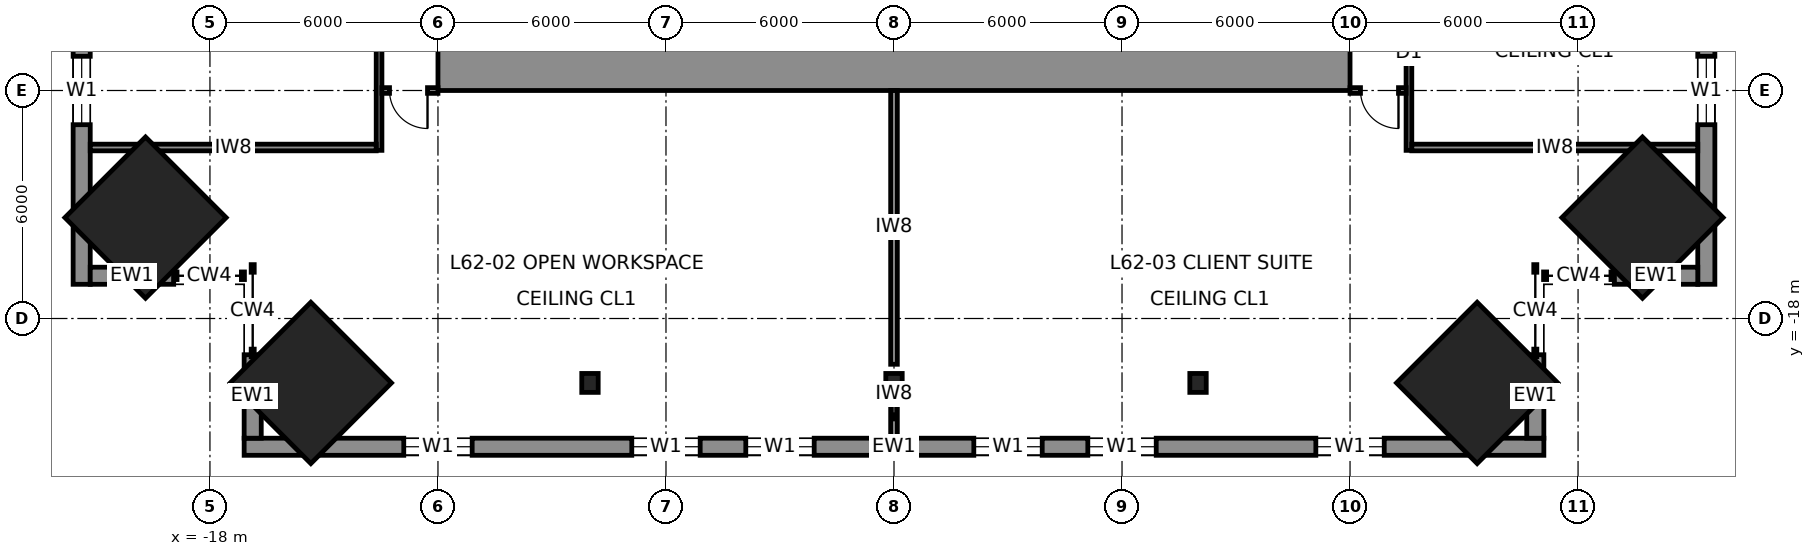
"""IFC4 building model, lengths in metres.
Left out: names, types, materials, properties, quantities, classifications, styles, units other than length and angle.
Written with IfcOpenShell. Run it as: python <this file> out.ifc"""

import sys

from ifc_helpers import new_model, si_unit, direction, frame, frame_2d, origin, origin_2d, place, context, subcontext, project, spatial, rectangle, i_section, extrude, element, fill, save


model = new_model("IFC4")
c1 = context("Model", 3, precision=1e-05, world=origin(), true_north=direction((0.0, 1.0)))
c2 = subcontext(c1, "Body", "Model", "MODEL_VIEW")
j1 = project(units=[si_unit("LENGTHUNIT", "METRE"), si_unit("PLANEANGLEUNIT", "RADIAN")], contexts=[c1])
p1 = place(None, origin())
s1 = spatial("IfcSite", under=j1, at=p1, CompositionType="ELEMENT")
p2 = place(p1, origin())
s2 = spatial("IfcBuilding", under=s1, at=p2, CompositionType="ELEMENT")
p3 = place(p2, frame((0.0, 0.0, 277.8)))
s3 = spatial("IfcBuildingStorey", under=s2, at=p3, CompositionType="ELEMENT", Elevation=277.8)
for number, where, z_axis, x_axis in (
    (1, (19.695, -15.345, 0.0), (-0.04, 0.04, 0.998), (-0.708, -0.707, 0.0)),
    (2, (15.345, -19.695, 0.0), (-0.04, 0.04, 0.998), (-0.707, -0.708, 0.0)),
    (3, (-15.345, -19.695, 0.0), (0.04, 0.04, 0.998), (-0.707, 0.708, 0.0)),
    (4, (-19.695, -15.345, 0.0), (0.04, 0.04, 0.998), (-0.708, 0.707, 0.0)),
):
    element("IfcColumn", number, at=place(p3, frame(where, z_axis=z_axis, x_axis=x_axis)), inside=s3, PredefinedType="COLUMN", context=c2, shape_type="SweptSolid", body=[
        extrude(rectangle(XDim=3.0, YDim=3.0, at=origin_2d()), origin(), (0.0, 0.0, 1.0), 4.007),
    ])
for number, where, z_axis, x_axis in (
    (5, (0.0, -19.695, 0.0), (0.0, 0.04, 0.999), (-1.0, 0.0, 0.0)),
    (6, (-8.0, -19.695, 0.0), (0.0, 0.04, 0.999), (-1.0, 0.0, 0.0)),
    (7, (8.0, -19.695, 0.0), (0.0, 0.04, 0.999), (-1.0, 0.0, 0.0)),
):
    element("IfcColumn", number, at=place(p3, frame(where, z_axis=z_axis, x_axis=x_axis)), inside=s3, PredefinedType="COLUMN", context=c2, shape_type="SweptSolid", body=[
        extrude(i_section(OverallWidth=0.432, OverallDepth=0.498, WebThickness=0.056, FlangeThickness=0.089, at=origin_2d()), origin(), (0.0, 0.0, 1.0), 4.003),
    ])
p4 = place(p3, frame((12.0, -11.25, 0.0), z_axis=(0.0, 0.0, 1.0), x_axis=(-1.0, 0.0, 0.0)))
e8 = element("IfcWall", 8, at=p4, inside=s3, PredefinedType="SHEAR", context=c2, shape_type="SweptSolid", body=[
    extrude(rectangle(XDim=24.0, YDim=1.5, at=frame_2d((12.0, 0.0))), origin(), (0.0, 0.0, 1.0), 4.0),
])
p5 = place(p3, frame((21.375, -17.1, 0.0), z_axis=(0.0, 0.0, 1.0), x_axis=(0.0, 1.0, 0.0)))
e9 = element("IfcWall", 9, at=p5, inside=s3, PredefinedType="SOLIDWALL", context=c2, shape_type="SweptSolid", body=[
    extrude(rectangle(XDim=34.2, YDim=0.45, at=frame_2d((17.1, 0.0))), origin(), (0.0, 0.0, 1.0), 3.83),
])
p6 = place(p5, frame((4.2, 0.0, 0.7)))
e10 = element("IfcOpeningElement", 10, at=p6, cuts=e9, PredefinedType="OPENING", context=c2, shape_type="SweptSolid", body=[
    extrude(rectangle(XDim=1.8, YDim=2.6, at=frame_2d((0.9, 1.3))), frame((0.0, 0.235, 0.0), z_axis=(0.0, -1.0, 0.0), x_axis=(1.0, 0.0, 0.0)), (0.0, 0.0, 1.0), 0.47),
])
p7 = place(p5, frame((10.2, 0.0, 0.7)))
e11 = element("IfcOpeningElement", 11, at=p7, cuts=e9, PredefinedType="OPENING", context=c2, shape_type="SweptSolid", body=[
    extrude(rectangle(XDim=1.8, YDim=2.6, at=frame_2d((0.9, 1.3))), frame((0.0, 0.235, 0.0), z_axis=(0.0, -1.0, 0.0), x_axis=(1.0, 0.0, 0.0)), (0.0, 0.0, 1.0), 0.47),
])
p8 = place(p5, frame((13.2, 0.0, 0.7)))
e12 = element("IfcOpeningElement", 12, at=p8, cuts=e9, PredefinedType="OPENING", context=c2, shape_type="SweptSolid", body=[
    extrude(rectangle(XDim=1.8, YDim=2.6, at=frame_2d((0.9, 1.3))), frame((0.0, 0.235, 0.0), z_axis=(0.0, -1.0, 0.0), x_axis=(1.0, 0.0, 0.0)), (0.0, 0.0, 1.0), 0.47),
])
p9 = place(p5, frame((19.2, 0.0, 0.7)))
e13 = element("IfcOpeningElement", 13, at=p9, cuts=e9, PredefinedType="OPENING", context=c2, shape_type="SweptSolid", body=[
    extrude(rectangle(XDim=1.8, YDim=2.6, at=frame_2d((0.9, 1.3))), frame((0.0, 0.235, 0.0), z_axis=(0.0, -1.0, 0.0), x_axis=(1.0, 0.0, 0.0)), (0.0, 0.0, 1.0), 0.47),
])
p10 = place(p5, frame((22.2, 0.0, 0.7)))
e14 = element("IfcOpeningElement", 14, at=p10, cuts=e9, PredefinedType="OPENING", context=c2, shape_type="SweptSolid", body=[
    extrude(rectangle(XDim=1.8, YDim=2.6, at=frame_2d((0.9, 1.3))), frame((0.0, 0.235, 0.0), z_axis=(0.0, -1.0, 0.0), x_axis=(1.0, 0.0, 0.0)), (0.0, 0.0, 1.0), 0.47),
])
p11 = place(p5, frame((28.2, 0.0, 0.7)))
e15 = element("IfcOpeningElement", 15, at=p11, cuts=e9, PredefinedType="OPENING", context=c2, shape_type="SweptSolid", body=[
    extrude(rectangle(XDim=1.8, YDim=2.6, at=frame_2d((0.9, 1.3))), frame((0.0, 0.235, 0.0), z_axis=(0.0, -1.0, 0.0), x_axis=(1.0, 0.0, 0.0)), (0.0, 0.0, 1.0), 0.47),
])
p12 = place(p3, frame((-17.1, -21.375, 0.0), z_axis=(0.0, 0.0, 1.0), x_axis=(1.0, 0.0, 0.0)))
e16 = element("IfcWall", 16, at=p12, inside=s3, PredefinedType="SOLIDWALL", context=c2, shape_type="SweptSolid", body=[
    extrude(rectangle(XDim=34.2, YDim=0.45, at=frame_2d((17.1, 0.0))), origin(), (0.0, 0.0, 1.0), 3.83),
])
p13 = place(p12, frame((4.2, 0.0, 0.7)))
e17 = element("IfcOpeningElement", 17, at=p13, cuts=e16, PredefinedType="OPENING", context=c2, shape_type="SweptSolid", body=[
    extrude(rectangle(XDim=1.8, YDim=2.6, at=frame_2d((0.9, 1.3))), frame((0.0, 0.235, 0.0), z_axis=(0.0, -1.0, 0.0), x_axis=(1.0, 0.0, 0.0)), (0.0, 0.0, 1.0), 0.47),
])
p14 = place(p12, frame((10.2, 0.0, 0.7)))
e18 = element("IfcOpeningElement", 18, at=p14, cuts=e16, PredefinedType="OPENING", context=c2, shape_type="SweptSolid", body=[
    extrude(rectangle(XDim=1.8, YDim=2.6, at=frame_2d((0.9, 1.3))), frame((0.0, 0.235, 0.0), z_axis=(0.0, -1.0, 0.0), x_axis=(1.0, 0.0, 0.0)), (0.0, 0.0, 1.0), 0.47),
])
p15 = place(p12, frame((13.2, 0.0, 0.7)))
e19 = element("IfcOpeningElement", 19, at=p15, cuts=e16, PredefinedType="OPENING", context=c2, shape_type="SweptSolid", body=[
    extrude(rectangle(XDim=1.8, YDim=2.6, at=frame_2d((0.9, 1.3))), frame((0.0, 0.235, 0.0), z_axis=(0.0, -1.0, 0.0), x_axis=(1.0, 0.0, 0.0)), (0.0, 0.0, 1.0), 0.47),
])
p16 = place(p12, frame((19.2, 0.0, 0.7)))
e20 = element("IfcOpeningElement", 20, at=p16, cuts=e16, PredefinedType="OPENING", context=c2, shape_type="SweptSolid", body=[
    extrude(rectangle(XDim=1.8, YDim=2.6, at=frame_2d((0.9, 1.3))), frame((0.0, 0.235, 0.0), z_axis=(0.0, -1.0, 0.0), x_axis=(1.0, 0.0, 0.0)), (0.0, 0.0, 1.0), 0.47),
])
p17 = place(p12, frame((22.2, 0.0, 0.7)))
e21 = element("IfcOpeningElement", 21, at=p17, cuts=e16, PredefinedType="OPENING", context=c2, shape_type="SweptSolid", body=[
    extrude(rectangle(XDim=1.8, YDim=2.6, at=frame_2d((0.9, 1.3))), frame((0.0, 0.235, 0.0), z_axis=(0.0, -1.0, 0.0), x_axis=(1.0, 0.0, 0.0)), (0.0, 0.0, 1.0), 0.47),
])
p18 = place(p12, frame((28.2, 0.0, 0.7)))
e22 = element("IfcOpeningElement", 22, at=p18, cuts=e16, PredefinedType="OPENING", context=c2, shape_type="SweptSolid", body=[
    extrude(rectangle(XDim=1.8, YDim=2.6, at=frame_2d((0.9, 1.3))), frame((0.0, 0.235, 0.0), z_axis=(0.0, -1.0, 0.0), x_axis=(1.0, 0.0, 0.0)), (0.0, 0.0, 1.0), 0.47),
])
p19 = place(p3, frame((-21.375, 17.1, 0.0), z_axis=(0.0, 0.0, 1.0), x_axis=(0.0, -1.0, 0.0)))
e23 = element("IfcWall", 23, at=p19, inside=s3, PredefinedType="SOLIDWALL", context=c2, shape_type="SweptSolid", body=[
    extrude(rectangle(XDim=34.2, YDim=0.45, at=frame_2d((17.1, 0.0))), origin(), (0.0, 0.0, 1.0), 3.83),
])
p20 = place(p19, frame((4.2, 0.0, 0.7)))
e24 = element("IfcOpeningElement", 24, at=p20, cuts=e23, PredefinedType="OPENING", context=c2, shape_type="SweptSolid", body=[
    extrude(rectangle(XDim=1.8, YDim=2.6, at=frame_2d((0.9, 1.3))), frame((0.0, 0.235, 0.0), z_axis=(0.0, -1.0, 0.0), x_axis=(1.0, 0.0, 0.0)), (0.0, 0.0, 1.0), 0.47),
])
p21 = place(p19, frame((10.2, 0.0, 0.7)))
e25 = element("IfcOpeningElement", 25, at=p21, cuts=e23, PredefinedType="OPENING", context=c2, shape_type="SweptSolid", body=[
    extrude(rectangle(XDim=1.8, YDim=2.6, at=frame_2d((0.9, 1.3))), frame((0.0, 0.235, 0.0), z_axis=(0.0, -1.0, 0.0), x_axis=(1.0, 0.0, 0.0)), (0.0, 0.0, 1.0), 0.47),
])
p22 = place(p19, frame((13.2, 0.0, 0.7)))
e26 = element("IfcOpeningElement", 26, at=p22, cuts=e23, PredefinedType="OPENING", context=c2, shape_type="SweptSolid", body=[
    extrude(rectangle(XDim=1.8, YDim=2.6, at=frame_2d((0.9, 1.3))), frame((0.0, 0.235, 0.0), z_axis=(0.0, -1.0, 0.0), x_axis=(1.0, 0.0, 0.0)), (0.0, 0.0, 1.0), 0.47),
])
p23 = place(p19, frame((19.2, 0.0, 0.7)))
e27 = element("IfcOpeningElement", 27, at=p23, cuts=e23, PredefinedType="OPENING", context=c2, shape_type="SweptSolid", body=[
    extrude(rectangle(XDim=1.8, YDim=2.6, at=frame_2d((0.9, 1.3))), frame((0.0, 0.235, 0.0), z_axis=(0.0, -1.0, 0.0), x_axis=(1.0, 0.0, 0.0)), (0.0, 0.0, 1.0), 0.47),
])
p24 = place(p19, frame((22.2, 0.0, 0.7)))
e28 = element("IfcOpeningElement", 28, at=p24, cuts=e23, PredefinedType="OPENING", context=c2, shape_type="SweptSolid", body=[
    extrude(rectangle(XDim=1.8, YDim=2.6, at=frame_2d((0.9, 1.3))), frame((0.0, 0.235, 0.0), z_axis=(0.0, -1.0, 0.0), x_axis=(1.0, 0.0, 0.0)), (0.0, 0.0, 1.0), 0.47),
])
p25 = place(p19, frame((28.2, 0.0, 0.7)))
e29 = element("IfcOpeningElement", 29, at=p25, cuts=e23, PredefinedType="OPENING", context=c2, shape_type="SweptSolid", body=[
    extrude(rectangle(XDim=1.8, YDim=2.6, at=frame_2d((0.9, 1.3))), frame((0.0, 0.235, 0.0), z_axis=(0.0, -1.0, 0.0), x_axis=(1.0, 0.0, 0.0)), (0.0, 0.0, 1.0), 0.47),
])
for number, where, z_axis, x_axis in (
    (30, (16.875, -18.954, 0.0), (0.0, 0.0, 1.0), (0.0, -1.0, 0.0)),
    (31, (18.954, -16.875, 0.0), (0.0, 0.0, 1.0), (1.0, 0.0, 0.0)),
    (32, (-16.875, -18.954, 0.0), (0.0, 0.0, 1.0), (0.0, -1.0, 0.0)),
    (33, (-18.954, -16.875, 0.0), (0.0, 0.0, 1.0), (-1.0, 0.0, 0.0)),
):
    element("IfcWall", number, at=place(p3, frame(where, z_axis=z_axis, x_axis=x_axis)), inside=s3, PredefinedType="SOLIDWALL", context=c2, shape_type="SweptSolid", body=[
        extrude(rectangle(XDim=2.196, YDim=0.45, at=frame_2d((1.098, 0.0))), origin(), (0.0, 0.0, 1.0), 3.83),
    ])
p26 = place(p3, frame((13.55, -13.575, 0.0), z_axis=(0.0, 0.0, 1.0), x_axis=(0.0, 1.0, 0.0)))
e34 = element("IfcWall", 34, at=p26, inside=s3, PredefinedType="PARTITIONING", context=c2, shape_type="SweptSolid", body=[
    extrude(rectangle(XDim=27.15, YDim=0.15, at=frame_2d((13.575, 0.0))), origin(), (0.0, 0.0, 1.0), 3.83),
])
p27 = place(p26, frame((3.175, 0.0, 0.0)))
e35 = element("IfcOpeningElement", 35, at=p27, cuts=e34, PredefinedType="OPENING", context=c2, shape_type="SweptSolid", body=[
    extrude(rectangle(XDim=1.0, YDim=2.3, at=frame_2d((0.5, 1.15))), frame((0.0, 0.085, 0.0), z_axis=(0.0, -1.0, 0.0), x_axis=(1.0, 0.0, 0.0)), (0.0, 0.0, 1.0), 0.17),
])
p28 = place(p26, frame((6.625, 0.0, 0.0)))
e36 = element("IfcOpeningElement", 36, at=p28, cuts=e34, PredefinedType="OPENING", context=c2, shape_type="SweptSolid", body=[
    extrude(rectangle(XDim=1.0, YDim=2.3, at=frame_2d((0.5, 1.15))), frame((0.0, 0.085, 0.0), z_axis=(0.0, -1.0, 0.0), x_axis=(1.0, 0.0, 0.0)), (0.0, 0.0, 1.0), 0.17),
])
p29 = place(p26, frame((17.075, 0.0, 0.0)))
e37 = element("IfcOpeningElement", 37, at=p29, cuts=e34, PredefinedType="OPENING", context=c2, shape_type="SweptSolid", body=[
    extrude(rectangle(XDim=1.0, YDim=2.3, at=frame_2d((0.5, 1.15))), frame((0.0, 0.085, 0.0), z_axis=(0.0, -1.0, 0.0), x_axis=(1.0, 0.0, 0.0)), (0.0, 0.0, 1.0), 0.17),
])
p30 = place(p26, frame((22.975, 0.0, 0.0)))
e38 = element("IfcOpeningElement", 38, at=p30, cuts=e34, PredefinedType="OPENING", context=c2, shape_type="SweptSolid", body=[
    extrude(rectangle(XDim=1.0, YDim=2.3, at=frame_2d((0.5, 1.15))), frame((0.0, 0.085, 0.0), z_axis=(0.0, -1.0, 0.0), x_axis=(1.0, 0.0, 0.0)), (0.0, 0.0, 1.0), 0.17),
])
p31 = place(p26, frame((9.825, 0.0, 0.0)))
e39 = element("IfcOpeningElement", 39, at=p31, cuts=e34, PredefinedType="OPENING", context=c2, shape_type="SweptSolid", body=[
    extrude(rectangle(XDim=1.0, YDim=2.3, at=frame_2d((0.5, 1.15))), frame((0.0, 0.085, 0.0), z_axis=(0.0, -1.0, 0.0), x_axis=(1.0, 0.0, 0.0)), (0.0, 0.0, 1.0), 0.17),
])
p32 = place(p3, frame((-13.55, 13.575, 0.0), z_axis=(0.0, 0.0, 1.0), x_axis=(0.0, -1.0, 0.0)))
e40 = element("IfcWall", 40, at=p32, inside=s3, PredefinedType="PARTITIONING", context=c2, shape_type="SweptSolid", body=[
    extrude(rectangle(XDim=27.15, YDim=0.15, at=frame_2d((13.575, 0.0))), origin(), (0.0, 0.0, 1.0), 3.83),
])
p33 = place(p32, frame((21.225, 0.0, 0.0)))
e41 = element("IfcOpeningElement", 41, at=p33, cuts=e40, PredefinedType="OPENING", context=c2, shape_type="SweptSolid", body=[
    extrude(rectangle(XDim=1.4, YDim=2.3, at=frame_2d((0.7, 1.15))), frame((0.0, 0.085, 0.0), z_axis=(0.0, -1.0, 0.0), x_axis=(1.0, 0.0, 0.0)), (0.0, 0.0, 1.0), 0.17),
])
p34 = place(p32, frame((9.075, 0.0, 0.0)))
e42 = element("IfcOpeningElement", 42, at=p34, cuts=e40, PredefinedType="OPENING", context=c2, shape_type="SweptSolid", body=[
    extrude(rectangle(XDim=1.0, YDim=2.3, at=frame_2d((0.5, 1.15))), frame((0.0, 0.085, 0.0), z_axis=(0.0, -1.0, 0.0), x_axis=(1.0, 0.0, 0.0)), (0.0, 0.0, 1.0), 0.17),
])
p35 = place(p32, frame((16.575, 0.0, 0.0)))
e43 = element("IfcOpeningElement", 43, at=p35, cuts=e40, PredefinedType="OPENING", context=c2, shape_type="SweptSolid", body=[
    extrude(rectangle(XDim=1.0, YDim=2.3, at=frame_2d((0.5, 1.15))), frame((0.0, 0.085, 0.0), z_axis=(0.0, -1.0, 0.0), x_axis=(1.0, 0.0, 0.0)), (0.0, 0.0, 1.0), 0.17),
])
p36 = place(p3, frame((13.475, -12.0, 0.0), z_axis=(0.0, 0.0, 1.0), x_axis=(-1.0, 0.0, 0.0)))
e44 = element("IfcWall", 44, at=p36, inside=s3, PredefinedType="PARTITIONING", context=c2, shape_type="SweptSolid", body=[
    extrude(rectangle(XDim=1.475, YDim=0.15, at=frame_2d((0.738, 0.0))), origin(), (0.0, 0.0, 1.0), 3.83),
])
p37 = place(p36, frame((0.2, 0.0, 0.0)))
e45 = element("IfcOpeningElement", 45, at=p37, cuts=e44, PredefinedType="OPENING", context=c2, shape_type="SweptSolid", body=[
    extrude(rectangle(XDim=1.0, YDim=2.3, at=frame_2d((0.5, 1.15))), frame((0.0, 0.085, 0.0), z_axis=(0.0, -1.0, 0.0), x_axis=(1.0, 0.0, 0.0)), (0.0, 0.0, 1.0), 0.17),
])
p38 = place(p3, frame((-12.0, -12.0, 0.0), z_axis=(0.0, 0.0, 1.0), x_axis=(-1.0, 0.0, 0.0)))
e46 = element("IfcWall", 46, at=p38, inside=s3, PredefinedType="PARTITIONING", context=c2, shape_type="SweptSolid", body=[
    extrude(rectangle(XDim=1.475, YDim=0.15, at=frame_2d((0.738, 0.0))), origin(), (0.0, 0.0, 1.0), 3.83),
])
p39 = place(p38, frame((0.275, 0.0, 0.0)))
e47 = element("IfcOpeningElement", 47, at=p39, cuts=e46, PredefinedType="OPENING", context=c2, shape_type="SweptSolid", body=[
    extrude(rectangle(XDim=1.0, YDim=2.3, at=frame_2d((0.5, 1.15))), frame((0.0, 0.085, 0.0), z_axis=(0.0, -1.0, 0.0), x_axis=(1.0, 0.0, 0.0)), (0.0, 0.0, 1.0), 0.17),
])
for number, where, z_axis, x_axis in (
    (48, (21.15, -13.5, 0.0), (0.0, 0.0, 1.0), (-1.0, 0.0, 0.0)),
    (49, (-13.625, -13.5, 0.0), (0.0, 0.0, 1.0), (-1.0, 0.0, 0.0)),
):
    element("IfcWall", number, at=place(p3, frame(where, z_axis=z_axis, x_axis=x_axis)), inside=s3, PredefinedType="PARTITIONING", context=c2, shape_type="SweptSolid", body=[
        extrude(rectangle(XDim=7.525, YDim=0.175, at=frame_2d((3.762, 0.0))), origin(), (0.0, 0.0, 1.0), 3.83),
    ])
p40 = place(p3, frame((0.0, -12.0, 0.0), z_axis=(0.0, 0.0, 1.0), x_axis=(0.0, -1.0, 0.0)))
e50 = element("IfcWall", 50, at=p40, inside=s3, PredefinedType="PARTITIONING", context=c2, shape_type="SweptSolid", body=[
    extrude(rectangle(XDim=7.204, YDim=0.175, at=frame_2d((3.602, 0.0))), origin(), (0.0, 0.0, 1.0), 3.24),
])
p41 = place(p3, frame((0.0, -20.025, 0.0), z_axis=(0.0, 0.0, 1.0), x_axis=(0.0, -1.0, 0.0)))
e51 = element("IfcWall", 51, at=p41, inside=s3, PredefinedType="PARTITIONING", context=c2, shape_type="SweptSolid", body=[
    extrude(rectangle(XDim=1.125, YDim=0.175, at=frame_2d((0.562, 0.0))), origin(), (0.0, 0.0, 1.0), 3.83),
])
p42 = place(p6, origin())
e52 = element("IfcWindow", 52, at=p42, inside=s3, PartitioningType="SINGLE_PANEL", PredefinedType="WINDOW", context=c2, shape_type="SweptSolid", body=[
    extrude(rectangle(XDim=1.8, YDim=2.6, at=frame_2d((0.9, 1.3))), frame((0.0, 0.03, 0.0), z_axis=(0.0, -1.0, 0.0), x_axis=(1.0, 0.0, 0.0)), (0.0, 0.0, 1.0), 0.06),
])
fill(e10, e52)
p43 = place(p13, origin())
e53 = element("IfcWindow", 53, at=p43, inside=s3, PartitioningType="SINGLE_PANEL", PredefinedType="WINDOW", context=c2, shape_type="SweptSolid", body=[
    extrude(rectangle(XDim=1.8, YDim=2.6, at=frame_2d((0.9, 1.3))), frame((0.0, 0.03, 0.0), z_axis=(0.0, -1.0, 0.0), x_axis=(1.0, 0.0, 0.0)), (0.0, 0.0, 1.0), 0.06),
])
fill(e17, e53)
p44 = place(p14, origin())
e54 = element("IfcWindow", 54, at=p44, inside=s3, PartitioningType="SINGLE_PANEL", PredefinedType="WINDOW", context=c2, shape_type="SweptSolid", body=[
    extrude(rectangle(XDim=1.8, YDim=2.6, at=frame_2d((0.9, 1.3))), frame((0.0, 0.03, 0.0), z_axis=(0.0, -1.0, 0.0), x_axis=(1.0, 0.0, 0.0)), (0.0, 0.0, 1.0), 0.06),
])
fill(e18, e54)
p45 = place(p15, origin())
e55 = element("IfcWindow", 55, at=p45, inside=s3, PartitioningType="SINGLE_PANEL", PredefinedType="WINDOW", context=c2, shape_type="SweptSolid", body=[
    extrude(rectangle(XDim=1.8, YDim=2.6, at=frame_2d((0.9, 1.3))), frame((0.0, 0.03, 0.0), z_axis=(0.0, -1.0, 0.0), x_axis=(1.0, 0.0, 0.0)), (0.0, 0.0, 1.0), 0.06),
])
fill(e19, e55)
p46 = place(p16, origin())
e56 = element("IfcWindow", 56, at=p46, inside=s3, PartitioningType="SINGLE_PANEL", PredefinedType="WINDOW", context=c2, shape_type="SweptSolid", body=[
    extrude(rectangle(XDim=1.8, YDim=2.6, at=frame_2d((0.9, 1.3))), frame((0.0, 0.03, 0.0), z_axis=(0.0, -1.0, 0.0), x_axis=(1.0, 0.0, 0.0)), (0.0, 0.0, 1.0), 0.06),
])
fill(e20, e56)
p47 = place(p17, origin())
e57 = element("IfcWindow", 57, at=p47, inside=s3, PartitioningType="SINGLE_PANEL", PredefinedType="WINDOW", context=c2, shape_type="SweptSolid", body=[
    extrude(rectangle(XDim=1.8, YDim=2.6, at=frame_2d((0.9, 1.3))), frame((0.0, 0.03, 0.0), z_axis=(0.0, -1.0, 0.0), x_axis=(1.0, 0.0, 0.0)), (0.0, 0.0, 1.0), 0.06),
])
fill(e21, e57)
p48 = place(p18, origin())
e58 = element("IfcWindow", 58, at=p48, inside=s3, PartitioningType="SINGLE_PANEL", PredefinedType="WINDOW", context=c2, shape_type="SweptSolid", body=[
    extrude(rectangle(XDim=1.8, YDim=2.6, at=frame_2d((0.9, 1.3))), frame((0.0, 0.03, 0.0), z_axis=(0.0, -1.0, 0.0), x_axis=(1.0, 0.0, 0.0)), (0.0, 0.0, 1.0), 0.06),
])
fill(e22, e58)
p49 = place(p25, origin())
e59 = element("IfcWindow", 59, at=p49, inside=s3, PartitioningType="SINGLE_PANEL", PredefinedType="WINDOW", context=c2, shape_type="SweptSolid", body=[
    extrude(rectangle(XDim=1.8, YDim=2.6, at=frame_2d((0.9, 1.3))), frame((0.0, 0.03, 0.0), z_axis=(0.0, -1.0, 0.0), x_axis=(1.0, 0.0, 0.0)), (0.0, 0.0, 1.0), 0.06),
])
fill(e29, e59)
p50 = place(p39, origin())
e60 = element("IfcDoor", 60, at=p50, inside=s3, OperationType="SINGLE_SWING_LEFT", PredefinedType="DOOR", context=c2, shape_type="SweptSolid", body=[
    extrude(rectangle(XDim=1.0, YDim=2.3, at=frame_2d((0.5, 1.15))), frame((0.0, 0.025, 0.0), z_axis=(0.0, -1.0, 0.0), x_axis=(1.0, 0.0, 0.0)), (0.0, 0.0, 1.0), 0.05),
])
fill(e47, e60)
p51 = place(p37, origin())
e61 = element("IfcDoor", 61, at=p51, inside=s3, OperationType="SINGLE_SWING_LEFT", PredefinedType="DOOR", context=c2, shape_type="SweptSolid", body=[
    extrude(rectangle(XDim=1.0, YDim=2.3, at=frame_2d((0.5, 1.15))), frame((0.0, 0.025, 0.0), z_axis=(0.0, -1.0, 0.0), x_axis=(1.0, 0.0, 0.0)), (0.0, 0.0, 1.0), 0.05),
])
fill(e45, e61)
save(model, sys.argv[1])
